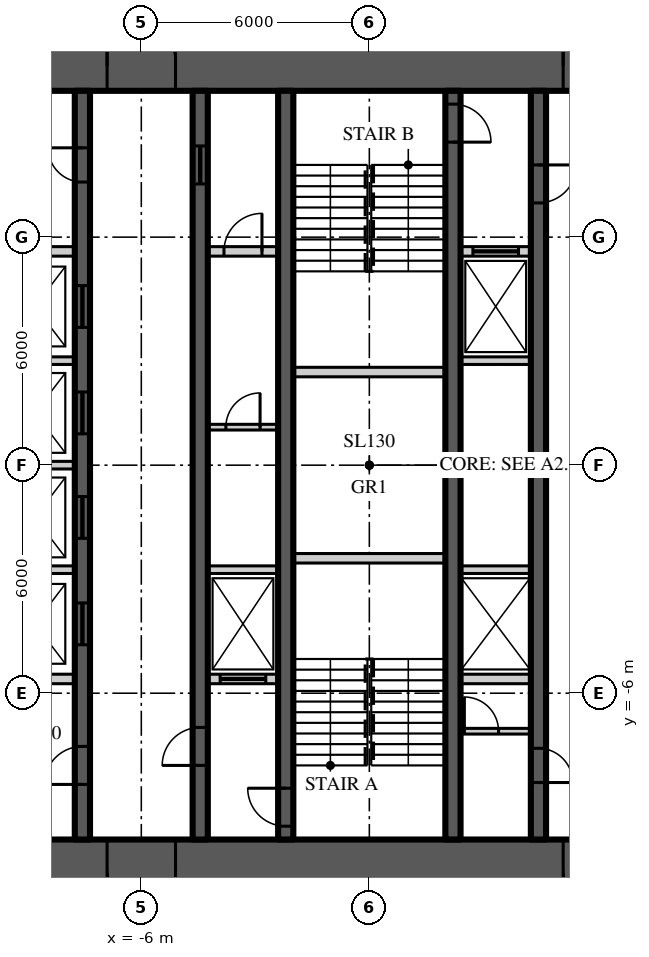
"""IFC4 building model, lengths in metres.
Left out: names, types, materials, properties, quantities, classifications, styles, units other than length and angle.
Written with IfcOpenShell. Run it as: python <this file> out.ifc"""

import sys

from ifc_helpers import new_model, si_unit, direction, frame, frame_2d, origin, place, context, subcontext, project, spatial, rectangle, extrude, element, fill, save


model = new_model("IFC4")
c1 = context("Model", 3, precision=1e-05, world=origin(), true_north=direction((0.0, 1.0)))
c2 = subcontext(c1, "Body", "Model", "MODEL_VIEW")
j1 = project(units=[si_unit("LENGTHUNIT", "METRE"), si_unit("PLANEANGLEUNIT", "RADIAN")], contexts=[c1])
p1 = place(None, origin())
s1 = spatial("IfcSite", under=j1, at=p1, CompositionType="ELEMENT")
p2 = place(p1, origin())
s2 = spatial("IfcBuilding", under=s1, at=p2, CompositionType="ELEMENT")
p3 = place(p2, frame((0.0, 0.0, 47.4)))
s3 = spatial("IfcBuildingStorey", under=s2, at=p3, CompositionType="ELEMENT", Elevation=47.4)
p4 = place(p3, frame((-11.15, 10.5, 0.0), z_axis=(0.0, 0.0, 1.0), x_axis=(1.0, 0.0, 0.0)))
e1 = element("IfcWall", 1, at=p4, inside=s3, PredefinedType="SHEAR", context=c2, shape_type="SweptSolid", body=[
    extrude(rectangle(XDim=22.3, YDim=1.3, at=frame_2d((11.15, 0.0))), origin(), (0.0, 0.0, 1.0), 3.9),
])
p5 = place(p4, frame((4.25, 0.0, 0.0)))
e2 = element("IfcOpeningElement", 2, at=p5, cuts=e1, PredefinedType="OPENING", context=c2, shape_type="SweptSolid", body=[
    extrude(rectangle(XDim=1.8, YDim=2.2, at=frame_2d((0.9, 1.1))), frame((0.0, 0.66, 0.0), z_axis=(0.0, -1.0, 0.0), x_axis=(1.0, 0.0, 0.0)), (0.0, 0.0, 1.0), 1.32),
])
p6 = place(p4, frame((16.25, 0.0, 0.0)))
e3 = element("IfcOpeningElement", 3, at=p6, cuts=e1, PredefinedType="OPENING", context=c2, shape_type="SweptSolid", body=[
    extrude(rectangle(XDim=1.8, YDim=2.2, at=frame_2d((0.9, 1.1))), frame((0.0, 0.66, 0.0), z_axis=(0.0, -1.0, 0.0), x_axis=(1.0, 0.0, 0.0)), (0.0, 0.0, 1.0), 1.32),
])
p7 = place(p3, frame((11.15, -10.5, 0.0), z_axis=(0.0, 0.0, 1.0), x_axis=(-1.0, 0.0, 0.0)))
e4 = element("IfcWall", 4, at=p7, inside=s3, PredefinedType="SHEAR", context=c2, shape_type="SweptSolid", body=[
    extrude(rectangle(XDim=22.3, YDim=1.3, at=frame_2d((11.15, 0.0))), origin(), (0.0, 0.0, 1.0), 3.9),
])
p8 = place(p7, frame((16.25, 0.0, 0.0)))
e5 = element("IfcOpeningElement", 5, at=p8, cuts=e4, PredefinedType="OPENING", context=c2, shape_type="SweptSolid", body=[
    extrude(rectangle(XDim=1.8, YDim=2.2, at=frame_2d((0.9, 1.1))), frame((0.0, 0.66, 0.0), z_axis=(0.0, -1.0, 0.0), x_axis=(1.0, 0.0, 0.0)), (0.0, 0.0, 1.0), 1.32),
])
p9 = place(p7, frame((4.25, 0.0, 0.0)))
e6 = element("IfcOpeningElement", 6, at=p9, cuts=e4, PredefinedType="OPENING", context=c2, shape_type="SweptSolid", body=[
    extrude(rectangle(XDim=1.8, YDim=2.2, at=frame_2d((0.9, 1.1))), frame((0.0, 0.66, 0.0), z_axis=(0.0, -1.0, 0.0), x_axis=(1.0, 0.0, 0.0)), (0.0, 0.0, 1.0), 1.32),
])
p10 = place(p3, frame((-7.55, -9.85, 0.0), z_axis=(0.0, 0.0, 1.0), x_axis=(0.0, 1.0, 0.0)))
e7 = element("IfcWall", 7, at=p10, inside=s3, PredefinedType="SHEAR", context=c2, shape_type="SweptSolid", body=[
    extrude(rectangle(XDim=19.7, YDim=0.4, at=frame_2d((9.85, 0.0))), origin(), (0.0, 0.0, 1.0), 3.9),
])
p11 = place(p10, frame((1.45, 0.0, 0.0)))
e8 = element("IfcOpeningElement", 8, at=p11, cuts=e7, PredefinedType="OPENING", context=c2, shape_type="SweptSolid", body=[
    extrude(rectangle(XDim=1.0, YDim=2.2, at=frame_2d((0.5, 1.1))), frame((0.0, 0.21, 0.0), z_axis=(0.0, -1.0, 0.0), x_axis=(1.0, 0.0, 0.0)), (0.0, 0.0, 1.0), 0.42),
])
p12 = place(p10, frame((17.3, 0.0, 0.0)))
e9 = element("IfcOpeningElement", 9, at=p12, cuts=e7, PredefinedType="OPENING", context=c2, shape_type="SweptSolid", body=[
    extrude(rectangle(XDim=0.9, YDim=2.1, at=frame_2d((0.45, 1.05))), frame((0.0, 0.21, 0.0), z_axis=(0.0, -1.0, 0.0), x_axis=(1.0, 0.0, 0.0)), (0.0, 0.0, 1.0), 0.42),
])
p13 = place(p10, frame((5.125, 0.0, 0.0)))
e10 = element("IfcOpeningElement", 10, at=p13, cuts=e7, PredefinedType="OPENING", context=c2, shape_type="SweptSolid", body=[
    extrude(rectangle(XDim=1.1, YDim=2.2, at=frame_2d((0.55, 1.1))), frame((0.0, 0.21, 0.0), z_axis=(0.0, -1.0, 0.0), x_axis=(1.0, 0.0, 0.0)), (0.0, 0.0, 1.0), 0.42),
])
p14 = place(p10, frame((7.925, 0.0, 0.0)))
e11 = element("IfcOpeningElement", 11, at=p14, cuts=e7, PredefinedType="OPENING", context=c2, shape_type="SweptSolid", body=[
    extrude(rectangle(XDim=1.1, YDim=2.2, at=frame_2d((0.55, 1.1))), frame((0.0, 0.21, 0.0), z_axis=(0.0, -1.0, 0.0), x_axis=(1.0, 0.0, 0.0)), (0.0, 0.0, 1.0), 0.42),
])
p15 = place(p10, frame((10.675, 0.0, 0.0)))
e12 = element("IfcOpeningElement", 12, at=p15, cuts=e7, PredefinedType="OPENING", context=c2, shape_type="SweptSolid", body=[
    extrude(rectangle(XDim=1.1, YDim=2.2, at=frame_2d((0.55, 1.1))), frame((0.0, 0.21, 0.0), z_axis=(0.0, -1.0, 0.0), x_axis=(1.0, 0.0, 0.0)), (0.0, 0.0, 1.0), 0.42),
])
p16 = place(p10, frame((13.475, 0.0, 0.0)))
e13 = element("IfcOpeningElement", 13, at=p16, cuts=e7, PredefinedType="OPENING", context=c2, shape_type="SweptSolid", body=[
    extrude(rectangle(XDim=1.1, YDim=2.2, at=frame_2d((0.55, 1.1))), frame((0.0, 0.21, 0.0), z_axis=(0.0, -1.0, 0.0), x_axis=(1.0, 0.0, 0.0)), (0.0, 0.0, 1.0), 0.42),
])
p17 = place(p3, frame((-4.45, -9.85, 0.0), z_axis=(0.0, 0.0, 1.0), x_axis=(0.0, 1.0, 0.0)))
e14 = element("IfcWall", 14, at=p17, inside=s3, PredefinedType="SHEAR", context=c2, shape_type="SweptSolid", body=[
    extrude(rectangle(XDim=19.7, YDim=0.4, at=frame_2d((9.85, 0.0))), origin(), (0.0, 0.0, 1.0), 3.9),
])
p18 = place(p17, frame((1.95, 0.0, 0.0)))
e15 = element("IfcOpeningElement", 15, at=p18, cuts=e14, PredefinedType="OPENING", context=c2, shape_type="SweptSolid", body=[
    extrude(rectangle(XDim=1.0, YDim=2.2, at=frame_2d((0.5, 1.1))), frame((0.0, 0.21, 0.0), z_axis=(0.0, -1.0, 0.0), x_axis=(1.0, 0.0, 0.0)), (0.0, 0.0, 1.0), 0.42),
])
p19 = place(p17, frame((17.25, 0.0, 0.0)))
e16 = element("IfcOpeningElement", 16, at=p19, cuts=e14, PredefinedType="OPENING", context=c2, shape_type="SweptSolid", body=[
    extrude(rectangle(XDim=1.0, YDim=2.1, at=frame_2d((0.5, 1.05))), frame((0.0, 0.21, 0.0), z_axis=(0.0, -1.0, 0.0), x_axis=(1.0, 0.0, 0.0)), (0.0, 0.0, 1.0), 0.42),
])
p20 = place(p3, frame((4.45, 9.85, 0.0), z_axis=(0.0, 0.0, 1.0), x_axis=(0.0, -1.0, 0.0)))
e17 = element("IfcWall", 17, at=p20, inside=s3, PredefinedType="SHEAR", context=c2, shape_type="SweptSolid", body=[
    extrude(rectangle(XDim=19.7, YDim=0.4, at=frame_2d((9.85, 0.0))), origin(), (0.0, 0.0, 1.0), 3.9),
])
p21 = place(p20, frame((1.95, 0.0, 0.0)))
e18 = element("IfcOpeningElement", 18, at=p21, cuts=e17, PredefinedType="OPENING", context=c2, shape_type="SweptSolid", body=[
    extrude(rectangle(XDim=1.0, YDim=2.2, at=frame_2d((0.5, 1.1))), frame((0.0, 0.21, 0.0), z_axis=(0.0, -1.0, 0.0), x_axis=(1.0, 0.0, 0.0)), (0.0, 0.0, 1.0), 0.42),
])
p22 = place(p20, frame((17.3, 0.0, 0.0)))
e19 = element("IfcOpeningElement", 19, at=p22, cuts=e17, PredefinedType="OPENING", context=c2, shape_type="SweptSolid", body=[
    extrude(rectangle(XDim=0.9, YDim=2.1, at=frame_2d((0.45, 1.05))), frame((0.0, 0.21, 0.0), z_axis=(0.0, -1.0, 0.0), x_axis=(1.0, 0.0, 0.0)), (0.0, 0.0, 1.0), 0.42),
])
p23 = place(p3, frame((-2.2, -9.85, 0.0), z_axis=(0.0, 0.0, 1.0), x_axis=(0.0, 1.0, 0.0)))
e20 = element("IfcWall", 20, at=p23, inside=s3, PredefinedType="SHEAR", context=c2, shape_type="SweptSolid", body=[
    extrude(rectangle(XDim=19.7, YDim=0.4, at=frame_2d((9.85, 0.0))), origin(), (0.0, 0.0, 1.0), 3.9),
])
p24 = place(p23, frame((0.35, 0.0, 0.0)))
e21 = element("IfcOpeningElement", 21, at=p24, cuts=e20, PredefinedType="OPENING", context=c2, shape_type="SweptSolid", body=[
    extrude(rectangle(XDim=1.0, YDim=2.2, at=frame_2d((0.5, 1.1))), frame((0.0, 0.21, 0.0), z_axis=(0.0, -1.0, 0.0), x_axis=(1.0, 0.0, 0.0)), (0.0, 0.0, 1.0), 0.42),
])
p25 = place(p3, frame((2.2, 9.85, 0.0), z_axis=(0.0, 0.0, 1.0), x_axis=(0.0, -1.0, 0.0)))
e22 = element("IfcWall", 22, at=p25, inside=s3, PredefinedType="SHEAR", context=c2, shape_type="SweptSolid", body=[
    extrude(rectangle(XDim=19.7, YDim=0.4, at=frame_2d((9.85, 0.0))), origin(), (0.0, 0.0, 1.0), 3.9),
])
p26 = place(p25, frame((0.35, 0.0, 0.0)))
e23 = element("IfcOpeningElement", 23, at=p26, cuts=e22, PredefinedType="OPENING", context=c2, shape_type="SweptSolid", body=[
    extrude(rectangle(XDim=1.0, YDim=2.2, at=frame_2d((0.5, 1.1))), frame((0.0, 0.21, 0.0), z_axis=(0.0, -1.0, 0.0), x_axis=(1.0, 0.0, 0.0)), (0.0, 0.0, 1.0), 0.42),
])
p27 = place(p3, frame((-9.85, 5.625, 0.0), z_axis=(0.0, 0.0, 1.0), x_axis=(1.0, 0.0, 0.0)))
e24 = element("IfcWall", 24, at=p27, inside=s3, PredefinedType="SOLIDWALL", context=c2, shape_type="SweptSolid", body=[
    extrude(rectangle(XDim=2.1, YDim=0.25, at=frame_2d((1.05, 0.0))), origin(), (0.0, 0.0, 1.0), 3.7),
])
p28 = place(p3, frame((-4.25, 5.625, 0.0), z_axis=(0.0, 0.0, 1.0), x_axis=(1.0, 0.0, 0.0)))
e25 = element("IfcWall", 25, at=p28, inside=s3, PredefinedType="SOLIDWALL", context=c2, shape_type="SweptSolid", body=[
    extrude(rectangle(XDim=1.85, YDim=0.25, at=frame_2d((0.925, 0.0))), origin(), (0.0, 0.0, 1.0), 3.7),
])
p29 = place(p28, frame((0.425, 0.0, 0.0)))
e26 = element("IfcOpeningElement", 26, at=p29, cuts=e25, PredefinedType="OPENING", context=c2, shape_type="SweptSolid", body=[
    extrude(rectangle(XDim=1.0, YDim=2.2, at=frame_2d((0.5, 1.1))), frame((0.0, 0.135, 0.0), z_axis=(0.0, -1.0, 0.0), x_axis=(1.0, 0.0, 0.0)), (0.0, 0.0, 1.0), 0.27),
])
p30 = place(p3, frame((2.4, 5.625, 0.0), z_axis=(0.0, 0.0, 1.0), x_axis=(1.0, 0.0, 0.0)))
e27 = element("IfcWall", 27, at=p30, inside=s3, PredefinedType="SOLIDWALL", context=c2, shape_type="SweptSolid", body=[
    extrude(rectangle(XDim=1.85, YDim=0.25, at=frame_2d((0.925, 0.0))), origin(), (0.0, 0.0, 1.0), 3.7),
])
p31 = place(p30, frame((0.325, 0.0, 0.0)))
e28 = element("IfcOpeningElement", 28, at=p31, cuts=e27, PredefinedType="OPENING", context=c2, shape_type="SweptSolid", body=[
    extrude(rectangle(XDim=1.2, YDim=2.2, at=frame_2d((0.6, 1.1))), frame((0.0, 0.135, 0.0), z_axis=(0.0, -1.0, 0.0), x_axis=(1.0, 0.0, 0.0)), (0.0, 0.0, 1.0), 0.27),
])
p32 = place(p3, frame((-9.85, -5.625, 0.0), z_axis=(0.0, 0.0, 1.0), x_axis=(1.0, 0.0, 0.0)))
e29 = element("IfcWall", 29, at=p32, inside=s3, PredefinedType="SOLIDWALL", context=c2, shape_type="SweptSolid", body=[
    extrude(rectangle(XDim=2.1, YDim=0.25, at=frame_2d((1.05, 0.0))), origin(), (0.0, 0.0, 1.0), 3.7),
])
p33 = place(p3, frame((-4.25, -5.625, 0.0), z_axis=(0.0, 0.0, 1.0), x_axis=(1.0, 0.0, 0.0)))
e30 = element("IfcWall", 30, at=p33, inside=s3, PredefinedType="SOLIDWALL", context=c2, shape_type="SweptSolid", body=[
    extrude(rectangle(XDim=1.85, YDim=0.25, at=frame_2d((0.925, 0.0))), origin(), (0.0, 0.0, 1.0), 3.7),
])
p34 = place(p33, frame((0.325, 0.0, 0.0)))
e31 = element("IfcOpeningElement", 31, at=p34, cuts=e30, PredefinedType="OPENING", context=c2, shape_type="SweptSolid", body=[
    extrude(rectangle(XDim=1.2, YDim=2.2, at=frame_2d((0.6, 1.1))), frame((0.0, 0.135, 0.0), z_axis=(0.0, -1.0, 0.0), x_axis=(1.0, 0.0, 0.0)), (0.0, 0.0, 1.0), 0.27),
])
p35 = place(p3, frame((2.4, -5.625, 0.0), z_axis=(0.0, 0.0, 1.0), x_axis=(1.0, 0.0, 0.0)))
e32 = element("IfcWall", 32, at=p35, inside=s3, PredefinedType="SOLIDWALL", context=c2, shape_type="SweptSolid", body=[
    extrude(rectangle(XDim=1.85, YDim=0.25, at=frame_2d((0.925, 0.0))), origin(), (0.0, 0.0, 1.0), 3.7),
])
for number, where, z_axis, x_axis in (
    (33, (-2.0, -2.45, 0.0), (0.0, 0.0, 1.0), (1.0, 0.0, 0.0)),
    (34, (-2.0, 2.45, 0.0), (0.0, 0.0, 1.0), (1.0, 0.0, 0.0)),
):
    element("IfcWall", number, at=place(p3, frame(where, z_axis=z_axis, x_axis=x_axis)), inside=s3, PredefinedType="SOLIDWALL", context=c2, shape_type="SweptSolid", body=[
        extrude(rectangle(XDim=4.0, YDim=0.25, at=frame_2d((2.0, 0.0))), origin(), (0.0, 0.0, 1.0), 3.7),
    ])
p36 = place(p3, frame((-9.85, -2.75, 0.0), z_axis=(0.0, 0.0, 1.0), x_axis=(1.0, 0.0, 0.0)))
e35 = element("IfcWall", 35, at=p36, inside=s3, PredefinedType="SOLIDWALL", context=c2, shape_type="SweptSolid", body=[
    extrude(rectangle(XDim=2.1, YDim=0.2, at=frame_2d((1.05, 0.0))), origin(), (0.0, 0.0, 1.0), 3.7),
])
for number, where, z_axis, x_axis in (
    (36, (-4.25, -2.75, 0.0), (0.0, 0.0, 1.0), (1.0, 0.0, 0.0)),
    (37, (2.4, -2.75, 0.0), (0.0, 0.0, 1.0), (1.0, 0.0, 0.0)),
):
    element("IfcWall", number, at=place(p3, frame(where, z_axis=z_axis, x_axis=x_axis)), inside=s3, PredefinedType="SOLIDWALL", context=c2, shape_type="SweptSolid", body=[
        extrude(rectangle(XDim=1.85, YDim=0.2, at=frame_2d((0.925, 0.0))), origin(), (0.0, 0.0, 1.0), 3.7),
    ])
for number, where, z_axis, x_axis in (
    (38, (-9.85, 0.0, 0.0), (0.0, 0.0, 1.0), (1.0, 0.0, 0.0)),
    (39, (-9.85, 2.75, 0.0), (0.0, 0.0, 1.0), (1.0, 0.0, 0.0)),
):
    element("IfcWall", number, at=place(p3, frame(where, z_axis=z_axis, x_axis=x_axis)), inside=s3, PredefinedType="SOLIDWALL", context=c2, shape_type="SweptSolid", body=[
        extrude(rectangle(XDim=2.1, YDim=0.2, at=frame_2d((1.05, 0.0))), origin(), (0.0, 0.0, 1.0), 3.7),
    ])
p37 = place(p3, frame((2.4, 2.75, 0.0), z_axis=(0.0, 0.0, 1.0), x_axis=(1.0, 0.0, 0.0)))
e40 = element("IfcWall", 40, at=p37, inside=s3, PredefinedType="SOLIDWALL", context=c2, shape_type="SweptSolid", body=[
    extrude(rectangle(XDim=1.85, YDim=0.2, at=frame_2d((0.925, 0.0))), origin(), (0.0, 0.0, 1.0), 3.7),
])
p38 = place(p3, frame((-4.25, 1.0, 0.0), z_axis=(0.0, 0.0, 1.0), x_axis=(1.0, 0.0, 0.0)))
e41 = element("IfcWall", 41, at=p38, inside=s3, PredefinedType="SOLIDWALL", context=c2, shape_type="SweptSolid", body=[
    extrude(rectangle(XDim=1.85, YDim=0.15, at=frame_2d((0.925, 0.0))), origin(), (0.0, 0.0, 1.0), 3.77),
])
p39 = place(p38, frame((0.475, 0.0, 0.0)))
e42 = element("IfcOpeningElement", 42, at=p39, cuts=e41, PredefinedType="OPENING", context=c2, shape_type="SweptSolid", body=[
    extrude(rectangle(XDim=0.9, YDim=2.1, at=frame_2d((0.45, 1.05))), frame((0.0, 0.085, 0.0), z_axis=(0.0, -1.0, 0.0), x_axis=(1.0, 0.0, 0.0)), (0.0, 0.0, 1.0), 0.17),
])
p40 = place(p3, frame((2.4, -7.0, 0.0), z_axis=(0.0, 0.0, 1.0), x_axis=(1.0, 0.0, 0.0)))
e43 = element("IfcWall", 43, at=p40, inside=s3, PredefinedType="SOLIDWALL", context=c2, shape_type="SweptSolid", body=[
    extrude(rectangle(XDim=1.85, YDim=0.15, at=frame_2d((0.925, 0.0))), origin(), (0.0, 0.0, 1.0), 3.77),
])
p41 = place(p40, frame((0.1, 0.0, 0.0)))
e44 = element("IfcOpeningElement", 44, at=p41, cuts=e43, PredefinedType="OPENING", context=c2, shape_type="SweptSolid", body=[
    extrude(rectangle(XDim=0.9, YDim=2.1, at=frame_2d((0.45, 1.05))), frame((0.0, 0.085, 0.0), z_axis=(0.0, -1.0, 0.0), x_axis=(1.0, 0.0, 0.0)), (0.0, 0.0, 1.0), 0.17),
])
p42 = place(p5, origin())
e45 = element("IfcDoor", 45, at=p42, inside=s3, OperationType="DOUBLE_DOOR_DOUBLE_SWING", PredefinedType="DOOR", context=c2, shape_type="SweptSolid", body=[
    extrude(rectangle(XDim=1.8, YDim=2.2, at=frame_2d((0.9, 1.1))), frame((0.0, 0.025, 0.0), z_axis=(0.0, -1.0, 0.0), x_axis=(1.0, 0.0, 0.0)), (0.0, 0.0, 1.0), 0.05),
])
fill(e2, e45)
p43 = place(p8, origin())
e46 = element("IfcDoor", 46, at=p43, inside=s3, OperationType="DOUBLE_DOOR_DOUBLE_SWING", PredefinedType="DOOR", context=c2, shape_type="SweptSolid", body=[
    extrude(rectangle(XDim=1.8, YDim=2.2, at=frame_2d((0.9, 1.1))), frame((0.0, 0.025, 0.0), z_axis=(0.0, -1.0, 0.0), x_axis=(1.0, 0.0, 0.0)), (0.0, 0.0, 1.0), 0.05),
])
fill(e5, e46)
p44 = place(p6, origin())
e47 = element("IfcDoor", 47, at=p44, inside=s3, OperationType="DOUBLE_DOOR_DOUBLE_SWING", PredefinedType="DOOR", context=c2, shape_type="SweptSolid", body=[
    extrude(rectangle(XDim=1.8, YDim=2.2, at=frame_2d((0.9, 1.1))), frame((0.0, 0.025, 0.0), z_axis=(0.0, -1.0, 0.0), x_axis=(1.0, 0.0, 0.0)), (0.0, 0.0, 1.0), 0.05),
])
fill(e3, e47)
p45 = place(p9, origin())
e48 = element("IfcDoor", 48, at=p45, inside=s3, OperationType="DOUBLE_DOOR_DOUBLE_SWING", PredefinedType="DOOR", context=c2, shape_type="SweptSolid", body=[
    extrude(rectangle(XDim=1.8, YDim=2.2, at=frame_2d((0.9, 1.1))), frame((0.0, 0.025, 0.0), z_axis=(0.0, -1.0, 0.0), x_axis=(1.0, 0.0, 0.0)), (0.0, 0.0, 1.0), 0.05),
])
fill(e6, e48)
p46 = place(p11, origin())
e49 = element("IfcDoor", 49, at=p46, inside=s3, OperationType="SINGLE_SWING_LEFT", PredefinedType="DOOR", context=c2, shape_type="SweptSolid", body=[
    extrude(rectangle(XDim=1.0, YDim=2.2, at=frame_2d((0.5, 1.1))), frame((0.0, 0.025, 0.0), z_axis=(0.0, -1.0, 0.0), x_axis=(1.0, 0.0, 0.0)), (0.0, 0.0, 1.0), 0.05),
])
fill(e8, e49)
p47 = place(p18, origin())
e50 = element("IfcDoor", 50, at=p47, inside=s3, OperationType="SINGLE_SWING_LEFT", PredefinedType="DOOR", context=c2, shape_type="SweptSolid", body=[
    extrude(rectangle(XDim=1.0, YDim=2.2, at=frame_2d((0.5, 1.1))), frame((0.0, 0.025, 0.0), z_axis=(0.0, -1.0, 0.0), x_axis=(1.0, 0.0, 0.0)), (0.0, 0.0, 1.0), 0.05),
])
fill(e15, e50)
p48 = place(p24, origin())
e51 = element("IfcDoor", 51, at=p48, inside=s3, OperationType="SINGLE_SWING_RIGHT", PredefinedType="DOOR", context=c2, shape_type="SweptSolid", body=[
    extrude(rectangle(XDim=1.0, YDim=2.2, at=frame_2d((0.5, 1.1))), frame((0.0, 0.025, 0.0), z_axis=(0.0, -1.0, 0.0), x_axis=(1.0, 0.0, 0.0)), (0.0, 0.0, 1.0), 0.05),
])
fill(e21, e51)
p49 = place(p21, origin())
e52 = element("IfcDoor", 52, at=p49, inside=s3, OperationType="SINGLE_SWING_LEFT", PredefinedType="DOOR", context=c2, shape_type="SweptSolid", body=[
    extrude(rectangle(XDim=1.0, YDim=2.2, at=frame_2d((0.5, 1.1))), frame((0.0, 0.025, 0.0), z_axis=(0.0, -1.0, 0.0), x_axis=(1.0, 0.0, 0.0)), (0.0, 0.0, 1.0), 0.05),
])
fill(e18, e52)
p50 = place(p26, origin())
e53 = element("IfcDoor", 53, at=p50, inside=s3, OperationType="SINGLE_SWING_RIGHT", PredefinedType="DOOR", context=c2, shape_type="SweptSolid", body=[
    extrude(rectangle(XDim=1.0, YDim=2.2, at=frame_2d((0.5, 1.1))), frame((0.0, 0.025, 0.0), z_axis=(0.0, -1.0, 0.0), x_axis=(1.0, 0.0, 0.0)), (0.0, 0.0, 1.0), 0.05),
])
fill(e23, e53)
p51 = place(p12, origin())
e54 = element("IfcDoor", 54, at=p51, inside=s3, OperationType="SINGLE_SWING_RIGHT", PredefinedType="DOOR", context=c2, shape_type="SweptSolid", body=[
    extrude(rectangle(XDim=0.9, YDim=2.1, at=frame_2d((0.45, 1.05))), frame((0.0, 0.025, 0.0), z_axis=(0.0, -1.0, 0.0), x_axis=(1.0, 0.0, 0.0)), (0.0, 0.0, 1.0), 0.05),
])
fill(e9, e54)
p52 = place(p19, origin())
e55 = element("IfcDoor", 55, at=p52, inside=s3, OperationType="SLIDING_TO_LEFT", PredefinedType="DOOR", context=c2, shape_type="SweptSolid", body=[
    extrude(rectangle(XDim=1.0, YDim=2.1, at=frame_2d((0.5, 1.05))), frame((0.0, 0.025, 0.0), z_axis=(0.0, -1.0, 0.0), x_axis=(1.0, 0.0, 0.0)), (0.0, 0.0, 1.0), 0.05),
])
fill(e16, e55)
p53 = place(p22, origin())
e56 = element("IfcDoor", 56, at=p53, inside=s3, OperationType="SINGLE_SWING_RIGHT", PredefinedType="DOOR", context=c2, shape_type="SweptSolid", body=[
    extrude(rectangle(XDim=0.9, YDim=2.1, at=frame_2d((0.45, 1.05))), frame((0.0, 0.025, 0.0), z_axis=(0.0, -1.0, 0.0), x_axis=(1.0, 0.0, 0.0)), (0.0, 0.0, 1.0), 0.05),
])
fill(e19, e56)
p54 = place(p13, origin())
e57 = element("IfcDoor", 57, at=p54, inside=s3, OperationType="SLIDING_TO_LEFT", PredefinedType="DOOR", context=c2, shape_type="SweptSolid", body=[
    extrude(rectangle(XDim=1.1, YDim=2.2, at=frame_2d((0.55, 1.1))), frame((0.0, 0.025, 0.0), z_axis=(0.0, -1.0, 0.0), x_axis=(1.0, 0.0, 0.0)), (0.0, 0.0, 1.0), 0.05),
])
fill(e10, e57)
p55 = place(p14, origin())
e58 = element("IfcDoor", 58, at=p55, inside=s3, OperationType="SLIDING_TO_LEFT", PredefinedType="DOOR", context=c2, shape_type="SweptSolid", body=[
    extrude(rectangle(XDim=1.1, YDim=2.2, at=frame_2d((0.55, 1.1))), frame((0.0, 0.025, 0.0), z_axis=(0.0, -1.0, 0.0), x_axis=(1.0, 0.0, 0.0)), (0.0, 0.0, 1.0), 0.05),
])
fill(e11, e58)
p56 = place(p15, origin())
e59 = element("IfcDoor", 59, at=p56, inside=s3, OperationType="SLIDING_TO_LEFT", PredefinedType="DOOR", context=c2, shape_type="SweptSolid", body=[
    extrude(rectangle(XDim=1.1, YDim=2.2, at=frame_2d((0.55, 1.1))), frame((0.0, 0.025, 0.0), z_axis=(0.0, -1.0, 0.0), x_axis=(1.0, 0.0, 0.0)), (0.0, 0.0, 1.0), 0.05),
])
fill(e12, e59)
p57 = place(p16, origin())
e60 = element("IfcDoor", 60, at=p57, inside=s3, OperationType="SLIDING_TO_LEFT", PredefinedType="DOOR", context=c2, shape_type="SweptSolid", body=[
    extrude(rectangle(XDim=1.1, YDim=2.2, at=frame_2d((0.55, 1.1))), frame((0.0, 0.025, 0.0), z_axis=(0.0, -1.0, 0.0), x_axis=(1.0, 0.0, 0.0)), (0.0, 0.0, 1.0), 0.05),
])
fill(e13, e60)
p58 = place(p34, origin())
e61 = element("IfcDoor", 61, at=p58, inside=s3, OperationType="SLIDING_TO_LEFT", PredefinedType="DOOR", context=c2, shape_type="SweptSolid", body=[
    extrude(rectangle(XDim=1.2, YDim=2.2, at=frame_2d((0.6, 1.1))), frame((0.0, 0.025, 0.0), z_axis=(0.0, -1.0, 0.0), x_axis=(1.0, 0.0, 0.0)), (0.0, 0.0, 1.0), 0.05),
])
fill(e31, e61)
p59 = place(p31, origin())
e62 = element("IfcDoor", 62, at=p59, inside=s3, OperationType="SLIDING_TO_LEFT", PredefinedType="DOOR", context=c2, shape_type="SweptSolid", body=[
    extrude(rectangle(XDim=1.2, YDim=2.2, at=frame_2d((0.6, 1.1))), frame((0.0, 0.025, 0.0), z_axis=(0.0, -1.0, 0.0), x_axis=(1.0, 0.0, 0.0)), (0.0, 0.0, 1.0), 0.05),
])
fill(e28, e62)
p60 = place(p39, origin())
e63 = element("IfcDoor", 63, at=p60, inside=s3, OperationType="SINGLE_SWING_RIGHT", PredefinedType="DOOR", context=c2, shape_type="SweptSolid", body=[
    extrude(rectangle(XDim=0.9, YDim=2.1, at=frame_2d((0.45, 1.05))), frame((0.0, 0.025, 0.0), z_axis=(0.0, -1.0, 0.0), x_axis=(1.0, 0.0, 0.0)), (0.0, 0.0, 1.0), 0.05),
])
fill(e42, e63)
p61 = place(p29, origin())
e64 = element("IfcDoor", 64, at=p61, inside=s3, OperationType="SINGLE_SWING_RIGHT", PredefinedType="DOOR", context=c2, shape_type="SweptSolid", body=[
    extrude(rectangle(XDim=1.0, YDim=2.2, at=frame_2d((0.5, 1.1))), frame((0.0, 0.025, 0.0), z_axis=(0.0, -1.0, 0.0), x_axis=(1.0, 0.0, 0.0)), (0.0, 0.0, 1.0), 0.05),
])
fill(e26, e64)
p62 = place(p41, origin())
e65 = element("IfcDoor", 65, at=p62, inside=s3, OperationType="SINGLE_SWING_LEFT", PredefinedType="DOOR", context=c2, shape_type="SweptSolid", body=[
    extrude(rectangle(XDim=0.9, YDim=2.1, at=frame_2d((0.45, 1.05))), frame((0.0, 0.025, 0.0), z_axis=(0.0, -1.0, 0.0), x_axis=(1.0, 0.0, 0.0)), (0.0, 0.0, 1.0), 0.05),
])
fill(e44, e65)
save(model, sys.argv[1])
